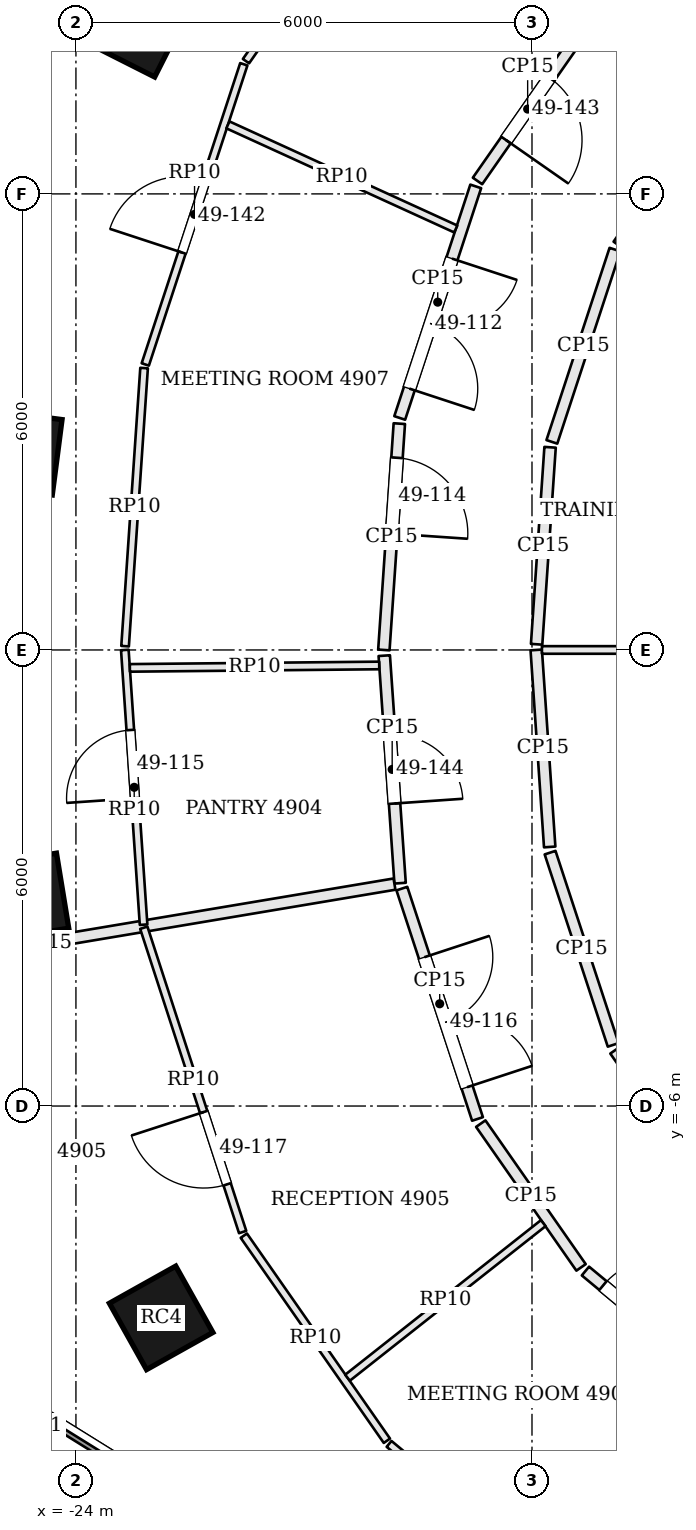
"""IFC4 building model, lengths in metres.
Left out: names, types, materials, properties, quantities, classifications, styles, units other than length and angle.
Written with IfcOpenShell. Run it as: python <this file> out.ifc"""

import sys

from ifc_helpers import new_model, si_unit, direction, frame, frame_2d, origin, origin_2d, place, context, subcontext, project, spatial, rectangle, extrude, element, fill, save


model = new_model("IFC4")
c1 = context("Model", 3, precision=1e-05, world=origin(), true_north=direction((0.0, 1.0)))
c2 = subcontext(c1, "Body", "Model", "MODEL_VIEW")
j1 = project(units=[si_unit("LENGTHUNIT", "METRE"), si_unit("PLANEANGLEUNIT", "RADIAN")], contexts=[c1])
p1 = place(None, origin())
s1 = spatial("IfcSite", under=j1, at=p1, CompositionType="ELEMENT")
p2 = place(p1, origin())
s2 = spatial("IfcBuilding", under=s1, at=p2, CompositionType="ELEMENT")
p3 = place(p2, frame((0.0, 0.0, 201.3)))
s3 = spatial("IfcBuildingStorey", under=s2, at=p3, CompositionType="ELEMENT", Elevation=201.3)
for number, where, z_axis, x_axis in (
    (1, (-23.185, 8.21, 0.0), (0.0, 0.0, 1.0), (-0.451, -0.893, 0.0)),
    (2, (-24.743, 2.599, 0.0), (0.0, 0.0, 1.0), (-0.128, -0.992, 0.0)),
    (3, (-24.669, -3.248, 0.0), (0.0, 0.0, 1.0), (0.162, -0.987, 0.0)),
    (4, (-22.879, -8.787, 0.0), (0.0, 0.0, 1.0), (0.489, -0.873, 0.0)),
):
    element("IfcColumn", number, at=place(p3, frame(where, z_axis=z_axis, x_axis=x_axis)), inside=s3, PredefinedType="COLUMN", context=c2, shape_type="SweptSolid", body=[
        extrude(rectangle(XDim=1.0, YDim=1.0, at=origin_2d()), origin(), (0.0, 0.0, 1.0), 3.9),
    ])
p4 = place(p3, frame((-27.016, -8.626, 0.0), z_axis=(0.0, 0.0, 1.0), x_axis=(0.849198377377, -0.528073968172, 0.0)))
e5 = element("IfcWall", 5, at=p4, inside=s3, PredefinedType="SOLIDWALL", context=c2, shape_type="SweptSolid", body=[
    extrude(rectangle(XDim=5.99, YDim=0.45, at=frame_2d((2.995, 0.0))), origin(), (0.0, 0.0, 1.0), 3.7),
])
p5 = place(p4, frame((1.945, 0.0, 0.9)))
e6 = element("IfcOpeningElement", 6, at=p5, cuts=e5, PredefinedType="OPENING", context=c2, shape_type="SweptSolid", body=[
    extrude(rectangle(XDim=2.1, YDim=2.3, at=frame_2d((1.05, 1.15))), frame((0.0, 0.235, 0.0), z_axis=(0.0, -1.0, 0.0), x_axis=(1.0, 0.0, 0.0)), (0.0, 0.0, 1.0), 0.47),
])
p6 = place(p3, frame((-26.965, -8.746, 3.9), z_axis=(0.0, 0.0, 1.0), x_axis=(0.849203312007, -0.528066032686, 0.0)))
e7 = element("IfcWall", 7, at=p6, inside=s3, PredefinedType="PARAPET", context=c2, shape_type="SweptSolid", body=[
    extrude(rectangle(XDim=4.113, YDim=0.3, at=frame_2d((2.056, 0.0))), origin(), (0.0, 0.0, 1.0), 1.1),
])
p7 = place(p3, frame((-17.397, 8.062, 0.0), z_axis=(0.0, 0.0, 1.0), x_axis=(-0.572118665737, -0.820170855563, 0.0)))
e8 = element("IfcWall", 8, at=p7, inside=s3, PredefinedType="PARTITIONING", context=c2, shape_type="SweptSolid", body=[
    extrude(rectangle(XDim=2.306, YDim=0.15, at=frame_2d((1.153, 0.0))), origin(), (0.0, 0.0, 1.0), 3.084),
])
p8 = place(p7, frame((0.65, 0.0, 0.0)))
e9 = element("IfcOpeningElement", 9, at=p8, cuts=e8, PredefinedType="OPENING", context=c2, shape_type="SweptSolid", body=[
    extrude(rectangle(XDim=1.0, YDim=2.1, at=frame_2d((0.5, 1.05))), frame((0.0, 0.085, 0.0), z_axis=(0.0, -1.0, 0.0), x_axis=(1.0, 0.0, 0.0)), (0.0, 0.0, 1.0), 0.17),
])
p9 = place(p3, frame((-18.74, 6.099, 0.0), z_axis=(0.0, 0.0, 1.0), x_axis=(-0.31188427026, -0.950120098706, 0.0)))
e10 = element("IfcWall", 10, at=p9, inside=s3, PredefinedType="PARTITIONING", context=c2, shape_type="SweptSolid", body=[
    extrude(rectangle(XDim=3.206, YDim=0.15, at=frame_2d((1.603, 0.0))), origin(), (0.0, 0.0, 1.0), 3.084),
])
p10 = place(p9, frame((1.0, 0.0, 0.0)))
e11 = element("IfcOpeningElement", 11, at=p10, cuts=e10, PredefinedType="OPENING", context=c2, shape_type="SweptSolid", body=[
    extrude(rectangle(XDim=1.8, YDim=2.1, at=frame_2d((0.9, 1.05))), frame((0.0, 0.085, 0.0), z_axis=(0.0, -1.0, 0.0), x_axis=(1.0, 0.0, 0.0)), (0.0, 0.0, 1.0), 0.17),
])
p11 = place(p3, frame((-19.745, 2.978, 0.0), z_axis=(0.0, 0.0, 1.0), x_axis=(-0.068142324, -0.997675610447, 0.0)))
e12 = element("IfcWall", 12, at=p11, inside=s3, PredefinedType="PARTITIONING", context=c2, shape_type="SweptSolid", body=[
    extrude(rectangle(XDim=2.984, YDim=0.15, at=frame_2d((1.492, 0.0))), origin(), (0.0, 0.0, 1.0), 3.084),
])
p12 = place(p11, frame((0.45, 0.0, 0.0)))
e13 = element("IfcOpeningElement", 13, at=p12, cuts=e12, PredefinedType="OPENING", context=c2, shape_type="SweptSolid", body=[
    extrude(rectangle(XDim=1.0, YDim=2.4, at=frame_2d((0.5, 1.2))), frame((0.0, 0.085, 0.0), z_axis=(0.0, -1.0, 0.0), x_axis=(1.0, 0.0, 0.0)), (0.0, 0.0, 1.0), 0.17),
])
p13 = place(p3, frame((-19.944, -0.075, 0.0), z_axis=(0.0, 0.0, 1.0), x_axis=(0.069483400546, -0.99758310784, 0.0)))
e14 = element("IfcWall", 14, at=p13, inside=s3, PredefinedType="PARTITIONING", context=c2, shape_type="SweptSolid", body=[
    extrude(rectangle(XDim=3.001, YDim=0.15, at=frame_2d((1.5, 0.0))), origin(), (0.0, 0.0, 1.0), 3.084),
])
p14 = place(p13, frame((1.05, 0.0, 0.0)))
e15 = element("IfcOpeningElement", 15, at=p14, cuts=e14, PredefinedType="OPENING", context=c2, shape_type="SweptSolid", body=[
    extrude(rectangle(XDim=0.9, YDim=2.1, at=frame_2d((0.45, 1.05))), frame((0.0, 0.085, 0.0), z_axis=(0.0, -1.0, 0.0), x_axis=(1.0, 0.0, 0.0)), (0.0, 0.0, 1.0), 0.17),
])
p15 = place(p3, frame((-28.982, -4.62, 0.0), z_axis=(0.0, 0.0, 1.0), x_axis=(0.986215284651, 0.16546725453, 0.0)))
e16 = element("IfcWall", 16, at=p15, inside=s3, PredefinedType="PARTITIONING", context=c2, shape_type="SweptSolid", body=[
    extrude(rectangle(XDim=9.301, YDim=0.15, at=frame_2d((4.651, 0.0))), origin(), (0.0, 0.0, 1.0), 3.084),
])
p16 = place(p3, frame((-19.712, -3.139, 0.0), z_axis=(0.0, 0.0, 1.0), x_axis=(0.311953946036, -0.950097224263, 0.0)))
e17 = element("IfcWall", 17, at=p16, inside=s3, PredefinedType="PARTITIONING", context=c2, shape_type="SweptSolid", body=[
    extrude(rectangle(XDim=3.19, YDim=0.15, at=frame_2d((1.595, 0.0))), origin(), (0.0, 0.0, 1.0), 3.084),
])
p17 = place(p16, frame((0.95, 0.0, 0.0)))
e18 = element("IfcOpeningElement", 18, at=p17, cuts=e17, PredefinedType="OPENING", context=c2, shape_type="SweptSolid", body=[
    extrude(rectangle(XDim=1.8, YDim=2.1, at=frame_2d((0.9, 1.05))), frame((0.0, 0.085, 0.0), z_axis=(0.0, -1.0, 0.0), x_axis=(1.0, 0.0, 0.0)), (0.0, 0.0, 1.0), 0.17),
])
p18 = place(p3, frame((-18.674, -6.232, 0.0), z_axis=(0.0, 0.0, 1.0), x_axis=(0.572118665737, -0.820170855563, 0.0)))
e19 = element("IfcWall", 19, at=p18, inside=s3, PredefinedType="PARTITIONING", context=c2, shape_type="SweptSolid", body=[
    extrude(rectangle(XDim=2.306, YDim=0.15, at=frame_2d((1.153, 0.0))), origin(), (0.0, 0.0, 1.0), 3.084),
])
p19 = place(p3, frame((-17.297, -8.171, 0.0), z_axis=(0.0, 0.0, 1.0), x_axis=(0.769228575061, -0.638973707839, 0.0)))
e20 = element("IfcWall", 20, at=p19, inside=s3, PredefinedType="PARTITIONING", context=c2, shape_type="SweptSolid", body=[
    extrude(rectangle(XDim=3.334, YDim=0.15, at=frame_2d((1.667, 0.0))), origin(), (0.0, 0.0, 1.0), 3.084),
])
p20 = place(p19, frame((0.3, 0.0, 0.0)))
e21 = element("IfcOpeningElement", 21, at=p20, cuts=e20, PredefinedType="OPENING", context=c2, shape_type="SweptSolid", body=[
    extrude(rectangle(XDim=1.0, YDim=2.4, at=frame_2d((0.5, 1.2))), frame((0.0, 0.085, 0.0), z_axis=(0.0, -1.0, 0.0), x_axis=(1.0, 0.0, 0.0)), (0.0, 0.0, 1.0), 0.17),
])
p21 = place(p19, frame((2.15, 0.0, 0.0)))
e22 = element("IfcOpeningElement", 22, at=p21, cuts=e20, PredefinedType="OPENING", context=c2, shape_type="SweptSolid", body=[
    extrude(rectangle(XDim=0.9, YDim=2.1, at=frame_2d((0.45, 1.05))), frame((0.0, 0.085, 0.0), z_axis=(0.0, -1.0, 0.0), x_axis=(1.0, 0.0, 0.0)), (0.0, 0.0, 1.0), 0.17),
])
p22 = place(p3, frame((-15.912, -6.696, 0.0), z_axis=(0.0, 0.0, 1.0), x_axis=(-0.572078533763, 0.820198848578, 0.0)))
e23 = element("IfcWall", 23, at=p22, inside=s3, PredefinedType="PARTITIONING", context=c2, shape_type="SweptSolid", body=[
    extrude(rectangle(XDim=1.742, YDim=0.15, at=frame_2d((0.871, 0.0))), origin(), (0.0, 0.0, 1.0), 3.084),
])
p23 = place(p3, frame((-16.932, -5.196, 0.0), z_axis=(0.0, 0.0, 1.0), x_axis=(-0.311904957484, 0.950113307715, 0.0)))
e24 = element("IfcWall", 24, at=p23, inside=s3, PredefinedType="PARTITIONING", context=c2, shape_type="SweptSolid", body=[
    extrude(rectangle(XDim=2.662, YDim=0.15, at=frame_2d((1.331, 0.0))), origin(), (0.0, 0.0, 1.0), 3.084),
])
p24 = place(p3, frame((-17.767, -2.592, 0.0), z_axis=(0.0, 0.0, 1.0), x_axis=(-0.068140828228, 0.997675712608, 0.0)))
e25 = element("IfcWall", 25, at=p24, inside=s3, PredefinedType="PARTITIONING", context=c2, shape_type="SweptSolid", body=[
    extrude(rectangle(XDim=2.598, YDim=0.15, at=frame_2d((1.299, 0.0))), origin(), (0.0, 0.0, 1.0), 3.084),
])
p25 = place(p3, frame((-17.939, 0.075, 0.0), z_axis=(0.0, 0.0, 1.0), x_axis=(0.068227980697, 0.997669756307, 0.0)))
e26 = element("IfcWall", 26, at=p25, inside=s3, PredefinedType="PARTITIONING", context=c2, shape_type="SweptSolid", body=[
    extrude(rectangle(XDim=2.598, YDim=0.15, at=frame_2d((1.299, 0.0))), origin(), (0.0, 0.0, 1.0), 3.084),
])
p26 = place(p3, frame((-17.739, 2.738, 0.0), z_axis=(0.0, 0.0, 1.0), x_axis=(0.311904957484, 0.950113307715, 0.0)))
e27 = element("IfcWall", 27, at=p26, inside=s3, PredefinedType="PARTITIONING", context=c2, shape_type="SweptSolid", body=[
    extrude(rectangle(XDim=2.662, YDim=0.15, at=frame_2d((1.331, 0.0))), origin(), (0.0, 0.0, 1.0), 3.084),
])
p27 = place(p3, frame((-16.865, 5.329, 0.0), z_axis=(0.0, 0.0, 1.0), x_axis=(0.572096615639, 0.820186236397, 0.0)))
e28 = element("IfcWall", 28, at=p27, inside=s3, PredefinedType="PARTITIONING", context=c2, shape_type="SweptSolid", body=[
    extrude(rectangle(XDim=1.753, YDim=0.15, at=frame_2d((0.876, 0.0))), origin(), (0.0, 0.0, 1.0), 3.084),
])
p28 = place(p3, frame((-23.11, -3.614, 0.0), z_axis=(0.0, 0.0, 1.0), x_axis=(-0.068138237138, 0.997675889575, 0.0)))
e29 = element("IfcWall", 29, at=p28, inside=s3, PredefinedType="PARTITIONING", context=c2, shape_type="SweptSolid", body=[
    extrude(rectangle(XDim=3.622, YDim=0.1, at=frame_2d((1.811, 0.0))), origin(), (0.0, 0.0, 1.0), 3.084),
])
p29 = place(p28, frame((1.667, 0.0, 0.0)))
e30 = element("IfcOpeningElement", 30, at=p29, cuts=e29, PredefinedType="OPENING", context=c2, shape_type="SweptSolid", body=[
    extrude(rectangle(XDim=0.9, YDim=2.1, at=frame_2d((0.45, 1.05))), frame((0.0, 0.06, 0.0), z_axis=(0.0, -1.0, 0.0), x_axis=(1.0, 0.0, 0.0)), (0.0, 0.0, 1.0), 0.12),
])
p30 = place(p3, frame((-23.354, 0.05, 0.0), z_axis=(0.0, 0.0, 1.0), x_axis=(0.068171479083, 0.997673618695, 0.0)))
e31 = element("IfcWall", 31, at=p30, inside=s3, PredefinedType="PARTITIONING", context=c2, shape_type="SweptSolid", body=[
    extrude(rectangle(XDim=3.667, YDim=0.1, at=frame_2d((1.833, 0.0))), origin(), (0.0, 0.0, 1.0), 3.084),
])
p31 = place(p3, frame((-23.088, 3.756, 0.0), z_axis=(0.0, 0.0, 1.0), x_axis=(0.311942747624, 0.950100901065, 0.0)))
e32 = element("IfcWall", 32, at=p31, inside=s3, PredefinedType="PARTITIONING", context=c2, shape_type="SweptSolid", body=[
    extrude(rectangle(XDim=4.157, YDim=0.1, at=frame_2d((2.078, 0.0))), origin(), (0.0, 0.0, 1.0), 3.084),
])
p32 = place(p31, frame((1.55, 0.0, 0.0)))
e33 = element("IfcOpeningElement", 33, at=p32, cuts=e32, PredefinedType="OPENING", context=c2, shape_type="SweptSolid", body=[
    extrude(rectangle(XDim=1.0, YDim=2.4, at=frame_2d((0.5, 1.2))), frame((0.0, 0.06, 0.0), z_axis=(0.0, -1.0, 0.0), x_axis=(1.0, 0.0, 0.0)), (0.0, 0.0, 1.0), 0.12),
])
p33 = place(p3, frame((-21.763, 7.746, 0.0), z_axis=(0.0, 0.0, 1.0), x_axis=(0.57207420081, 0.820201870741, 0.0)))
e34 = element("IfcWall", 34, at=p33, inside=s3, PredefinedType="PARTITIONING", context=c2, shape_type="SweptSolid", body=[
    extrude(rectangle(XDim=3.271, YDim=0.1, at=frame_2d((1.636, 0.0))), origin(), (0.0, 0.0, 1.0), 3.084),
])
p34 = place(p33, frame((1.799, 0.0, 0.0)))
e35 = element("IfcOpeningElement", 35, at=p34, cuts=e34, PredefinedType="OPENING", context=c2, shape_type="SweptSolid", body=[
    extrude(rectangle(XDim=1.0, YDim=2.1, at=frame_2d((0.5, 1.05))), frame((0.0, 0.06, 0.0), z_axis=(0.0, -1.0, 0.0), x_axis=(1.0, 0.0, 0.0)), (0.0, 0.0, 1.0), 0.12),
])
p35 = place(p3, frame((-19.003, 5.538, 0.0), z_axis=(0.0, 0.0, 1.0), x_axis=(-0.909578475077, 0.41553218609, 0.0)))
e36 = element("IfcWall", 36, at=p35, inside=s3, PredefinedType="PARTITIONING", context=c2, shape_type="SweptSolid", body=[
    extrude(rectangle(XDim=3.296, YDim=0.1, at=frame_2d((1.648, 0.0))), origin(), (0.0, 0.0, 1.0), 3.084),
])
p36 = place(p3, frame((-20.01, -0.204, 0.0), z_axis=(0.0, 0.0, 1.0), x_axis=(-0.999952479937, -0.009748736688, 0.0)))
e37 = element("IfcWall", 37, at=p36, inside=s3, PredefinedType="PARTITIONING", context=c2, shape_type="SweptSolid", body=[
    extrude(rectangle(XDim=3.281, YDim=0.1, at=frame_2d((1.64, 0.0))), origin(), (0.0, 0.0, 1.0), 3.084),
])
p37 = place(p3, frame((-16.62, -13.153, 0.0), z_axis=(0.0, 0.0, 1.0), x_axis=(-0.76922129881, 0.638982467253, 0.0)))
e38 = element("IfcWall", 38, at=p37, inside=s3, PredefinedType="PARTITIONING", context=c2, shape_type="SweptSolid", body=[
    extrude(rectangle(XDim=4.238, YDim=0.1, at=frame_2d((2.119, 0.0))), origin(), (0.0, 0.0, 1.0), 3.084),
])
p38 = place(p3, frame((-19.909, -10.404, 0.0), z_axis=(0.0, 0.0, 1.0), x_axis=(-0.572111951901, 0.820175538828, 0.0)))
e39 = element("IfcWall", 39, at=p38, inside=s3, PredefinedType="PARTITIONING", context=c2, shape_type="SweptSolid", body=[
    extrude(rectangle(XDim=3.29, YDim=0.1, at=frame_2d((1.645, 0.0))), origin(), (0.0, 0.0, 1.0), 3.084),
])
p39 = place(p3, frame((-21.807, -7.658, 0.0), z_axis=(0.0, 0.0, 1.0), x_axis=(-0.308962792332, 0.951074125899, 0.0)))
e40 = element("IfcWall", 40, at=p39, inside=s3, PredefinedType="PARTITIONING", context=c2, shape_type="SweptSolid", body=[
    extrude(rectangle(XDim=4.209, YDim=0.1, at=frame_2d((2.105, 0.0))), origin(), (0.0, 0.0, 1.0), 3.084),
])
p40 = place(p39, frame((0.66, 0.0, 0.0)))
e41 = element("IfcOpeningElement", 41, at=p40, cuts=e40, PredefinedType="OPENING", context=c2, shape_type="SweptSolid", body=[
    extrude(rectangle(XDim=1.0, YDim=2.1, at=frame_2d((0.5, 1.05))), frame((0.0, 0.06, 0.0), z_axis=(0.0, -1.0, 0.0), x_axis=(1.0, 0.0, 0.0)), (0.0, 0.0, 1.0), 0.12),
])
p41 = place(p3, frame((-17.852, -7.541, 0.0), z_axis=(0.0, 0.0, 1.0), x_axis=(-0.784859909174, -0.61967323887, 0.0)))
e42 = element("IfcWall", 42, at=p41, inside=s3, PredefinedType="PARTITIONING", context=c2, shape_type="SweptSolid", body=[
    extrude(rectangle(XDim=3.281, YDim=0.1, at=frame_2d((1.641, 0.0))), origin(), (0.0, 0.0, 1.0), 3.084),
])
p42 = place(p3, frame((-15.854, -9.467, 0.0), z_axis=(0.0, 0.0, 1.0), x_axis=(-0.611487785641, -0.791253870772, 0.0)))
e43 = element("IfcWall", 43, at=p42, inside=s3, PredefinedType="PARTITIONING", context=c2, shape_type="SweptSolid", body=[
    extrude(rectangle(XDim=3.277, YDim=0.1, at=frame_2d((1.639, 0.0))), origin(), (0.0, 0.0, 1.0), 3.084),
])
p43 = place(p3, frame((-17.869, 0.0, 0.0), z_axis=(0.0, 0.0, 1.0), x_axis=(1.0, 0.0, 0.0)))
e44 = element("IfcWall", 44, at=p43, inside=s3, PredefinedType="PARTITIONING", context=c2, shape_type="SweptSolid", body=[
    extrude(rectangle(XDim=2.794, YDim=0.1, at=frame_2d((1.397, 0.0))), origin(), (0.0, 0.0, 1.0), 3.084),
])
p44 = place(p5, origin())
e45 = element("IfcWindow", 45, at=p44, inside=s3, PartitioningType="SINGLE_PANEL", PredefinedType="WINDOW", context=c2, shape_type="SweptSolid", body=[
    extrude(rectangle(XDim=2.1, YDim=2.3, at=frame_2d((1.05, 1.15))), frame((0.0, 0.135, 0.0), z_axis=(0.0, -1.0, 0.0), x_axis=(1.0, 0.0, 0.0)), (0.0, 0.0, 1.0), 0.06),
])
fill(e6, e45)
p45 = place(p10, origin())
e46 = element("IfcDoor", 46, at=p45, inside=s3, OperationType="DOUBLE_DOOR_SINGLE_SWING", PredefinedType="DOOR", context=c2, shape_type="SweptSolid", body=[
    extrude(rectangle(XDim=1.8, YDim=2.1, at=frame_2d((0.9, 1.05))), frame((0.0, 0.025, 0.0), z_axis=(0.0, -1.0, 0.0), x_axis=(1.0, 0.0, 0.0)), (0.0, 0.0, 1.0), 0.05),
])
fill(e11, e46)
p46 = place(p12, origin())
e47 = element("IfcDoor", 47, at=p46, inside=s3, OperationType="SINGLE_SWING_RIGHT", PredefinedType="DOOR", context=c2, shape_type="SweptSolid", body=[
    extrude(rectangle(XDim=1.0, YDim=2.4, at=frame_2d((0.5, 1.2))), frame((0.0, 0.025, 0.0), z_axis=(0.0, -1.0, 0.0), x_axis=(1.0, 0.0, 0.0)), (0.0, 0.0, 1.0), 0.05),
])
fill(e13, e47)
p47 = place(p29, origin())
e48 = element("IfcDoor", 48, at=p47, inside=s3, OperationType="SINGLE_SWING_LEFT", PredefinedType="DOOR", context=c2, shape_type="SweptSolid", body=[
    extrude(rectangle(XDim=0.9, YDim=2.1, at=frame_2d((0.45, 1.05))), frame((0.0, 0.025, 0.0), z_axis=(0.0, -1.0, 0.0), x_axis=(1.0, 0.0, 0.0)), (0.0, 0.0, 1.0), 0.05),
])
fill(e30, e48)
p48 = place(p17, origin())
e49 = element("IfcDoor", 49, at=p48, inside=s3, OperationType="DOUBLE_DOOR_SINGLE_SWING", PredefinedType="DOOR", context=c2, shape_type="SweptSolid", body=[
    extrude(rectangle(XDim=1.8, YDim=2.1, at=frame_2d((0.9, 1.05))), frame((0.0, 0.025, 0.0), z_axis=(0.0, -1.0, 0.0), x_axis=(1.0, 0.0, 0.0)), (0.0, 0.0, 1.0), 0.05),
])
fill(e18, e49)
p49 = place(p40, origin())
e50 = element("IfcDoor", 50, at=p49, inside=s3, OperationType="SINGLE_SWING_RIGHT", PredefinedType="DOOR", context=c2, shape_type="SweptSolid", body=[
    extrude(rectangle(XDim=1.0, YDim=2.1, at=frame_2d((0.5, 1.05))), frame((0.0, 0.025, 0.0), z_axis=(0.0, -1.0, 0.0), x_axis=(1.0, 0.0, 0.0)), (0.0, 0.0, 1.0), 0.05),
])
fill(e41, e50)
p50 = place(p20, origin())
e51 = element("IfcDoor", 51, at=p50, inside=s3, OperationType="SINGLE_SWING_RIGHT", PredefinedType="DOOR", context=c2, shape_type="SweptSolid", body=[
    extrude(rectangle(XDim=1.0, YDim=2.4, at=frame_2d((0.5, 1.2))), frame((0.0, 0.025, 0.0), z_axis=(0.0, -1.0, 0.0), x_axis=(1.0, 0.0, 0.0)), (0.0, 0.0, 1.0), 0.05),
])
fill(e21, e51)
p51 = place(p32, origin())
e52 = element("IfcDoor", 52, at=p51, inside=s3, OperationType="SINGLE_SWING_LEFT", PredefinedType="DOOR", context=c2, shape_type="SweptSolid", body=[
    extrude(rectangle(XDim=1.0, YDim=2.4, at=frame_2d((0.5, 1.2))), frame((0.0, 0.025, 0.0), z_axis=(0.0, -1.0, 0.0), x_axis=(1.0, 0.0, 0.0)), (0.0, 0.0, 1.0), 0.05),
])
fill(e33, e52)
p52 = place(p8, origin())
e53 = element("IfcDoor", 53, at=p52, inside=s3, OperationType="SINGLE_SWING_RIGHT", PredefinedType="DOOR", context=c2, shape_type="SweptSolid", body=[
    extrude(rectangle(XDim=1.0, YDim=2.1, at=frame_2d((0.5, 1.05))), frame((0.0, 0.025, 0.0), z_axis=(0.0, -1.0, 0.0), x_axis=(1.0, 0.0, 0.0)), (0.0, 0.0, 1.0), 0.05),
])
fill(e9, e53)
p53 = place(p14, origin())
e54 = element("IfcDoor", 54, at=p53, inside=s3, OperationType="SINGLE_SWING_RIGHT", PredefinedType="DOOR", context=c2, shape_type="SweptSolid", body=[
    extrude(rectangle(XDim=0.9, YDim=2.1, at=frame_2d((0.45, 1.05))), frame((0.0, 0.025, 0.0), z_axis=(0.0, -1.0, 0.0), x_axis=(1.0, 0.0, 0.0)), (0.0, 0.0, 1.0), 0.05),
])
fill(e15, e54)
save(model, sys.argv[1])
